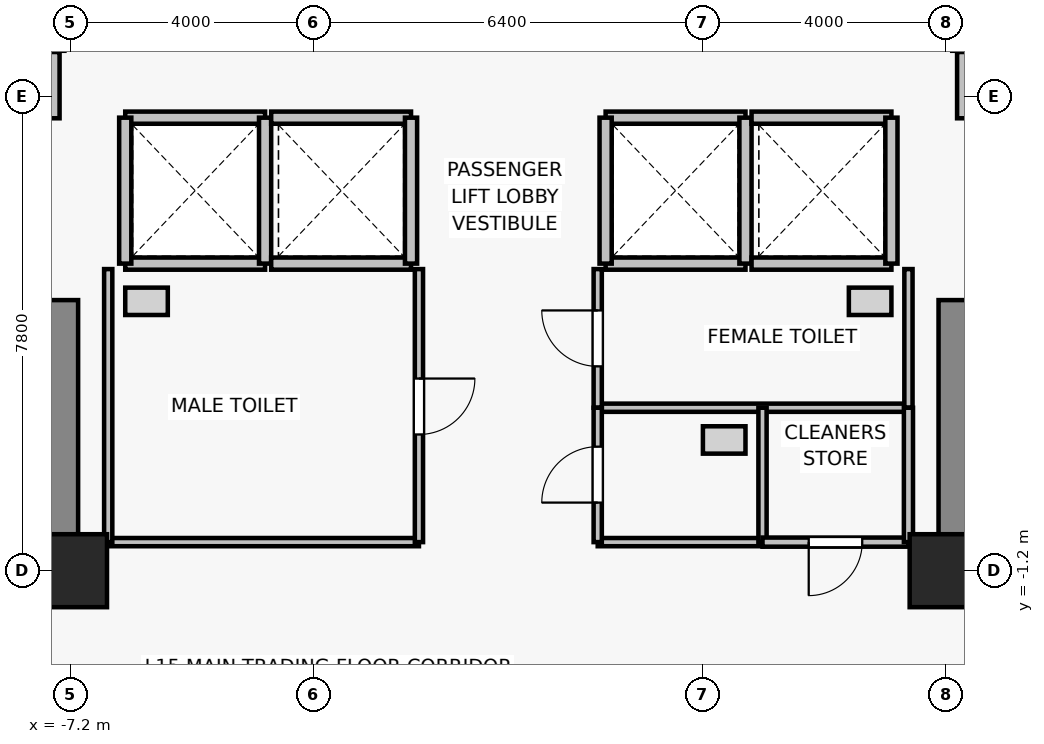
"""IFC4 building model, lengths in metres.
Left out: names, types, materials, properties, quantities, classifications, styles, units other than length and angle.
Written with IfcOpenShell. Run it as: python <this file> out.ifc"""

import sys

from ifc_helpers import new_model, si_unit, direction, frame, frame_2d, origin, origin_2d, place, context, subcontext, project, spatial, rectangle, extrude, source, transform, mapped, element, fill, save


model = new_model("IFC4")
c1 = context("Model", 3, precision=1e-05, world=origin(), true_north=direction((0.0, 1.0)))
c2 = subcontext(c1, "Body", "Model", "MODEL_VIEW")
j1 = project(units=[si_unit("LENGTHUNIT", "METRE"), si_unit("PLANEANGLEUNIT", "RADIAN")], contexts=[c1])
p1 = place(None, origin())
s1 = spatial("IfcSite", under=j1, at=p1, CompositionType="ELEMENT")
p2 = place(p1, origin())
s2 = spatial("IfcBuilding", under=s1, at=p2, CompositionType="ELEMENT")
p3 = place(p2, frame((0.0, 0.0, 57.1)))
s3 = spatial("IfcBuildingStorey", under=s2, at=p3, CompositionType="ELEMENT", Elevation=57.1)
for number, where, z_axis, x_axis in (
    (1, (-7.2, -1.2, 0.0), (0.0, 0.0, 1.0), (1.0, 0.0, 0.0)),
    (2, (7.2, -1.2, 0.0), (0.0, 0.0, 1.0), (1.0, 0.0, 0.0)),
):
    element("IfcColumn", number, at=place(p3, frame(where, z_axis=z_axis, x_axis=x_axis)), inside=s3, PredefinedType="COLUMN", context=c2, shape_type="SweptSolid", body=[
        extrude(rectangle(XDim=1.2, YDim=1.2, at=origin_2d()), origin(), (0.0, 0.0, 1.0), 3.3),
    ])
for number, where, z_axis, x_axis in (
    (3, (-7.4, -0.75, 0.0), (0.0, 0.0, 1.0), (0.0, 1.0, 0.0)),
    (4, (7.4, -0.75, 0.0), (0.0, 0.0, 1.0), (0.0, 1.0, 0.0)),
):
    element("IfcWall", number, at=place(p3, frame(where, z_axis=z_axis, x_axis=x_axis)), inside=s3, PredefinedType="SHEAR", context=c2, shape_type="SweptSolid", body=[
        extrude(rectangle(XDim=4.0, YDim=0.65, at=frame_2d((2.0, 0.0))), origin(), (0.0, 0.0, 1.0), 3.075),
    ])
for number, where, z_axis, x_axis in (
    (5, (-4.0, 3.85, 0.0), (0.0, 0.0, 1.0), (-1.0, 0.0, 0.0)),
    (6, (-6.3, 6.25, 0.0), (0.0, 0.0, 1.0), (1.0, 0.0, 0.0)),
):
    element("IfcWall", number, at=place(p3, frame(where, z_axis=z_axis, x_axis=x_axis)), inside=s3, PredefinedType="SOLIDWALL", context=c2, shape_type="SweptSolid", body=[
        extrude(rectangle(XDim=2.3, YDim=0.2, at=frame_2d((1.15, 0.0))), origin(), (0.0, 0.0, 1.0), 3.075),
    ])
for number, where, z_axis, x_axis in (
    (7, (-6.3, 3.85, 0.0), (0.0, 0.0, 1.0), (0.0, 1.0, 0.0)),
    (8, (-4.0, 6.25, 0.0), (0.0, 0.0, 1.0), (0.0, -1.0, 0.0)),
):
    element("IfcWall", number, at=place(p3, frame(where, z_axis=z_axis, x_axis=x_axis)), inside=s3, PredefinedType="SOLIDWALL", context=c2, shape_type="SweptSolid", body=[
        extrude(rectangle(XDim=2.4, YDim=0.2, at=frame_2d((1.2, 0.0))), origin(), (0.0, 0.0, 1.0), 3.075),
    ])
for number, where, z_axis, x_axis in (
    (9, (-1.6, 3.85, 0.0), (0.0, 0.0, 1.0), (-1.0, 0.0, 0.0)),
    (10, (-3.9, 6.25, 0.0), (0.0, 0.0, 1.0), (1.0, 0.0, 0.0)),
):
    element("IfcWall", number, at=place(p3, frame(where, z_axis=z_axis, x_axis=x_axis)), inside=s3, PredefinedType="SOLIDWALL", context=c2, shape_type="SweptSolid", body=[
        extrude(rectangle(XDim=2.3, YDim=0.2, at=frame_2d((1.15, 0.0))), origin(), (0.0, 0.0, 1.0), 3.075),
    ])
p4 = place(p3, frame((-1.6, 6.25, 0.0), z_axis=(0.0, 0.0, 1.0), x_axis=(0.0, -1.0, 0.0)))
e11 = element("IfcWall", 11, at=p4, inside=s3, PredefinedType="SOLIDWALL", context=c2, shape_type="SweptSolid", body=[
    extrude(rectangle(XDim=2.4, YDim=0.2, at=frame_2d((1.2, 0.0))), origin(), (0.0, 0.0, 1.0), 3.075),
])
for number, where, z_axis, x_axis in (
    (12, (3.9, 3.85, 0.0), (0.0, 0.0, 1.0), (-1.0, 0.0, 0.0)),
    (13, (1.6, 6.25, 0.0), (0.0, 0.0, 1.0), (1.0, 0.0, 0.0)),
):
    element("IfcWall", number, at=place(p3, frame(where, z_axis=z_axis, x_axis=x_axis)), inside=s3, PredefinedType="SOLIDWALL", context=c2, shape_type="SweptSolid", body=[
        extrude(rectangle(XDim=2.3, YDim=0.2, at=frame_2d((1.15, 0.0))), origin(), (0.0, 0.0, 1.0), 3.075),
    ])
for number, where, z_axis, x_axis in (
    (14, (1.6, 3.85, 0.0), (0.0, 0.0, 1.0), (0.0, 1.0, 0.0)),
    (15, (3.9, 6.25, 0.0), (0.0, 0.0, 1.0), (0.0, -1.0, 0.0)),
):
    element("IfcWall", number, at=place(p3, frame(where, z_axis=z_axis, x_axis=x_axis)), inside=s3, PredefinedType="SOLIDWALL", context=c2, shape_type="SweptSolid", body=[
        extrude(rectangle(XDim=2.4, YDim=0.2, at=frame_2d((1.2, 0.0))), origin(), (0.0, 0.0, 1.0), 3.075),
    ])
for number, where, z_axis, x_axis in (
    (16, (6.3, 3.85, 0.0), (0.0, 0.0, 1.0), (-1.0, 0.0, 0.0)),
    (17, (4.0, 6.25, 0.0), (0.0, 0.0, 1.0), (1.0, 0.0, 0.0)),
):
    element("IfcWall", number, at=place(p3, frame(where, z_axis=z_axis, x_axis=x_axis)), inside=s3, PredefinedType="SOLIDWALL", context=c2, shape_type="SweptSolid", body=[
        extrude(rectangle(XDim=2.3, YDim=0.2, at=frame_2d((1.15, 0.0))), origin(), (0.0, 0.0, 1.0), 3.075),
    ])
p5 = place(p3, frame((6.3, 6.25, 0.0), z_axis=(0.0, 0.0, 1.0), x_axis=(0.0, -1.0, 0.0)))
e18 = element("IfcWall", 18, at=p5, inside=s3, PredefinedType="SOLIDWALL", context=c2, shape_type="SweptSolid", body=[
    extrude(rectangle(XDim=2.4, YDim=0.2, at=frame_2d((1.2, 0.0))), origin(), (0.0, 0.0, 1.0), 3.075),
])
for number, where, z_axis, x_axis in (
    (19, (-7.4, 7.35, 0.0), (0.0, 0.0, 1.0), (-1.0, 0.0, 0.0)),
    (20, (9.6, 7.35, 0.0), (0.0, 0.0, 1.0), (-1.0, 0.0, 0.0)),
):
    element("IfcWall", number, at=place(p3, frame(where, z_axis=z_axis, x_axis=x_axis)), inside=s3, PredefinedType="SOLIDWALL", context=c2, shape_type="SweptSolid", body=[
        extrude(rectangle(XDim=2.2, YDim=0.2, at=frame_2d((1.1, 0.0))), origin(), (0.0, 0.0, 1.0), 2.465),
    ])
for number, where, z_axis, x_axis in (
    (21, (-7.47, 7.33, 0.0), (0.0, 0.0, 1.0), (0.0, -1.0, 0.0)),
    (22, (7.47, 6.24, 0.0), (0.0, 0.0, 1.0), (0.0, 1.0, 0.0)),
):
    element("IfcWall", number, at=place(p3, frame(where, z_axis=z_axis, x_axis=x_axis)), inside=s3, PredefinedType="PARTITIONING", context=c2, shape_type="SweptSolid", body=[
        extrude(rectangle(XDim=1.09, YDim=0.18, at=frame_2d((0.545, 0.0))), origin(), (0.0, 0.0, 1.0), 2.465),
    ])
p6 = place(p3, frame((-1.47, -0.73, 0.0), z_axis=(0.0, 0.0, 1.0), x_axis=(-1.0, 0.0, 0.0)))
e23 = element("IfcWall", 23, at=p6, inside=s3, PredefinedType="PARTITIONING", context=c2, shape_type="SweptSolid", body=[
    extrude(rectangle(XDim=5.11, YDim=0.135, at=frame_2d((2.555, 0.0))), origin(), (0.0, 0.0, 1.0), 3.075),
])
p7 = place(p3, frame((-6.58, -0.73, 0.0), z_axis=(0.0, 0.0, 1.0), x_axis=(0.0, 1.0, 0.0)))
e24 = element("IfcWall", 24, at=p7, inside=s3, PredefinedType="PARTITIONING", context=c2, shape_type="SweptSolid", body=[
    extrude(rectangle(XDim=4.49, YDim=0.135, at=frame_2d((2.245, 0.0))), origin(), (0.0, 0.0, 1.0), 3.075),
])
p8 = place(p3, frame((-1.47, 3.76, 0.0), z_axis=(0.0, 0.0, 1.0), x_axis=(0.0, -1.0, 0.0)))
e25 = element("IfcWall", 25, at=p8, inside=s3, PredefinedType="PARTITIONING", context=c2, shape_type="SweptSolid", body=[
    extrude(rectangle(XDim=4.49, YDim=0.135, at=frame_2d((2.245, 0.0))), origin(), (0.0, 0.0, 1.0), 3.075),
])
p9 = place(p8, frame((1.8, 0.0, 0.0)))
e26 = element("IfcOpeningElement", 26, at=p9, cuts=e25, PredefinedType="OPENING", context=c2, shape_type="SweptSolid", body=[
    extrude(rectangle(XDim=0.92, YDim=2.1, at=frame_2d((0.46, 1.05))), frame((0.0, 0.077, 0.0), z_axis=(0.0, -1.0, 0.0), x_axis=(1.0, 0.0, 0.0)), (0.0, 0.0, 1.0), 0.155),
])
p10 = place(p3, frame((6.58, 1.48, 0.0), z_axis=(0.0, 0.0, 1.0), x_axis=(-1.0, 0.0, 0.0)))
e27 = element("IfcWall", 27, at=p10, inside=s3, PredefinedType="PARTITIONING", context=c2, shape_type="SweptSolid", body=[
    extrude(rectangle(XDim=5.11, YDim=0.135, at=frame_2d((2.555, 0.0))), origin(), (0.0, 0.0, 1.0), 3.075),
])
p11 = place(p3, frame((1.47, 1.48, 0.0), z_axis=(0.0, 0.0, 1.0), x_axis=(0.0, 1.0, 0.0)))
e28 = element("IfcWall", 28, at=p11, inside=s3, PredefinedType="PARTITIONING", context=c2, shape_type="SweptSolid", body=[
    extrude(rectangle(XDim=2.28, YDim=0.135, at=frame_2d((1.14, 0.0))), origin(), (0.0, 0.0, 1.0), 3.075),
])
p12 = place(p11, frame((0.68, 0.0, 0.0)))
e29 = element("IfcOpeningElement", 29, at=p12, cuts=e28, PredefinedType="OPENING", context=c2, shape_type="SweptSolid", body=[
    extrude(rectangle(XDim=0.92, YDim=2.1, at=frame_2d((0.46, 1.05))), frame((0.0, 0.077, 0.0), z_axis=(0.0, -1.0, 0.0), x_axis=(1.0, 0.0, 0.0)), (0.0, 0.0, 1.0), 0.155),
])
p13 = place(p3, frame((6.58, 3.76, 0.0), z_axis=(0.0, 0.0, 1.0), x_axis=(0.0, -1.0, 0.0)))
e30 = element("IfcWall", 30, at=p13, inside=s3, PredefinedType="PARTITIONING", context=c2, shape_type="SweptSolid", body=[
    extrude(rectangle(XDim=2.28, YDim=0.135, at=frame_2d((1.14, 0.0))), origin(), (0.0, 0.0, 1.0), 3.075),
])
p14 = place(p3, frame((4.18, -0.73, 0.0), z_axis=(0.0, 0.0, 1.0), x_axis=(-1.0, 0.0, 0.0)))
e31 = element("IfcWall", 31, at=p14, inside=s3, PredefinedType="PARTITIONING", context=c2, shape_type="SweptSolid", body=[
    extrude(rectangle(XDim=2.71, YDim=0.135, at=frame_2d((1.355, 0.0))), origin(), (0.0, 0.0, 1.0), 3.075),
])
p15 = place(p3, frame((1.47, -0.73, 0.0), z_axis=(0.0, 0.0, 1.0), x_axis=(0.0, 1.0, 0.0)))
e32 = element("IfcWall", 32, at=p15, inside=s3, PredefinedType="PARTITIONING", context=c2, shape_type="SweptSolid", body=[
    extrude(rectangle(XDim=2.21, YDim=0.135, at=frame_2d((1.105, 0.0))), origin(), (0.0, 0.0, 1.0), 3.075),
])
p16 = place(p15, frame((0.65, 0.0, 0.0)))
e33 = element("IfcOpeningElement", 33, at=p16, cuts=e32, PredefinedType="OPENING", context=c2, shape_type="SweptSolid", body=[
    extrude(rectangle(XDim=0.92, YDim=2.1, at=frame_2d((0.46, 1.05))), frame((0.0, 0.077, 0.0), z_axis=(0.0, -1.0, 0.0), x_axis=(1.0, 0.0, 0.0)), (0.0, 0.0, 1.0), 0.155),
])
p17 = place(p3, frame((4.18, 1.48, 0.0), z_axis=(0.0, 0.0, 1.0), x_axis=(0.0, -1.0, 0.0)))
e34 = element("IfcWall", 34, at=p17, inside=s3, PredefinedType="PARTITIONING", context=c2, shape_type="SweptSolid", body=[
    extrude(rectangle(XDim=2.21, YDim=0.135, at=frame_2d((1.105, 0.0))), origin(), (0.0, 0.0, 1.0), 3.075),
])
p18 = place(p3, frame((6.58, -0.73, 0.0), z_axis=(0.0, 0.0, 1.0), x_axis=(-1.0, 0.0, 0.0)))
e35 = element("IfcWall", 35, at=p18, inside=s3, PredefinedType="PARTITIONING", context=c2, shape_type="SweptSolid", body=[
    extrude(rectangle(XDim=2.4, YDim=0.15, at=frame_2d((1.2, 0.0))), origin(), (0.0, 0.0, 1.0), 3.075),
])
p19 = place(p18, frame((0.76, 0.0, 0.0)))
e36 = element("IfcOpeningElement", 36, at=p19, cuts=e35, PredefinedType="OPENING", context=c2, shape_type="SweptSolid", body=[
    extrude(rectangle(XDim=0.88, YDim=2.1, at=frame_2d((0.44, 1.05))), frame((0.0, 0.085, 0.0), z_axis=(0.0, -1.0, 0.0), x_axis=(1.0, 0.0, 0.0)), (0.0, 0.0, 1.0), 0.17),
])
p20 = place(p3, frame((6.58, 1.48, 0.0), z_axis=(0.0, 0.0, 1.0), x_axis=(0.0, -1.0, 0.0)))
e37 = element("IfcWall", 37, at=p20, inside=s3, PredefinedType="PARTITIONING", context=c2, shape_type="SweptSolid", body=[
    extrude(rectangle(XDim=2.21, YDim=0.15, at=frame_2d((1.105, 0.0))), origin(), (0.0, 0.0, 1.0), 3.075),
])
m1 = source(origin(), c2, "Body", "SweptSolid", [
    extrude(rectangle(XDim=0.92, YDim=2.1, at=frame_2d((0.46, 1.05))), frame((0.0, 0.025, 0.0), z_axis=(0.0, -1.0, 0.0), x_axis=(1.0, 0.0, 0.0)), (0.0, 0.0, 1.0), 0.05),
])
p21 = place(p9, origin())
e38 = element("IfcDoor", 38, at=p21, inside=s3, OperationType="SINGLE_SWING_LEFT", PredefinedType="DOOR", context=c2, shape_type="MappedRepresentation", body=[
    mapped(m1, transform((0.0, 0.0, 0.0), x_axis=(1.0, 0.0, 0.0), y_axis=(0.0, 1.0, 0.0), z_axis=(0.0, 0.0, 1.0), scale=1.0)),
])
fill(e26, e38)
p22 = place(p12, origin())
e39 = element("IfcDoor", 39, at=p22, inside=s3, OperationType="SINGLE_SWING_RIGHT", PredefinedType="DOOR", context=c2, shape_type="MappedRepresentation", body=[
    mapped(m1, transform((0.0, 0.0, 0.0), x_axis=(1.0, 0.0, 0.0), y_axis=(0.0, 1.0, 0.0), z_axis=(0.0, 0.0, 1.0), scale=1.0)),
])
fill(e29, e39)
p23 = place(p16, origin())
e40 = element("IfcDoor", 40, at=p23, inside=s3, OperationType="SINGLE_SWING_LEFT", PredefinedType="DOOR", context=c2, shape_type="MappedRepresentation", body=[
    mapped(m1, transform((0.0, 0.0, 0.0), x_axis=(1.0, 0.0, 0.0), y_axis=(0.0, 1.0, 0.0), z_axis=(0.0, 0.0, 1.0), scale=1.0)),
])
fill(e33, e40)
m2 = source(origin(), c2, "Body", "SweptSolid", [
    extrude(rectangle(XDim=0.88, YDim=2.1, at=frame_2d((0.44, 1.05))), frame((0.0, 0.025, 0.0), z_axis=(0.0, -1.0, 0.0), x_axis=(1.0, 0.0, 0.0)), (0.0, 0.0, 1.0), 0.05),
])
p24 = place(p19, origin())
e41 = element("IfcDoor", 41, at=p24, inside=s3, OperationType="SINGLE_SWING_RIGHT", PredefinedType="DOOR", context=c2, shape_type="MappedRepresentation", body=[
    mapped(m2, transform((0.0, 0.0, 0.0), x_axis=(1.0, 0.0, 0.0), y_axis=(0.0, 1.0, 0.0), z_axis=(0.0, 0.0, 1.0), scale=1.0)),
])
fill(e36, e41)
save(model, sys.argv[1])
